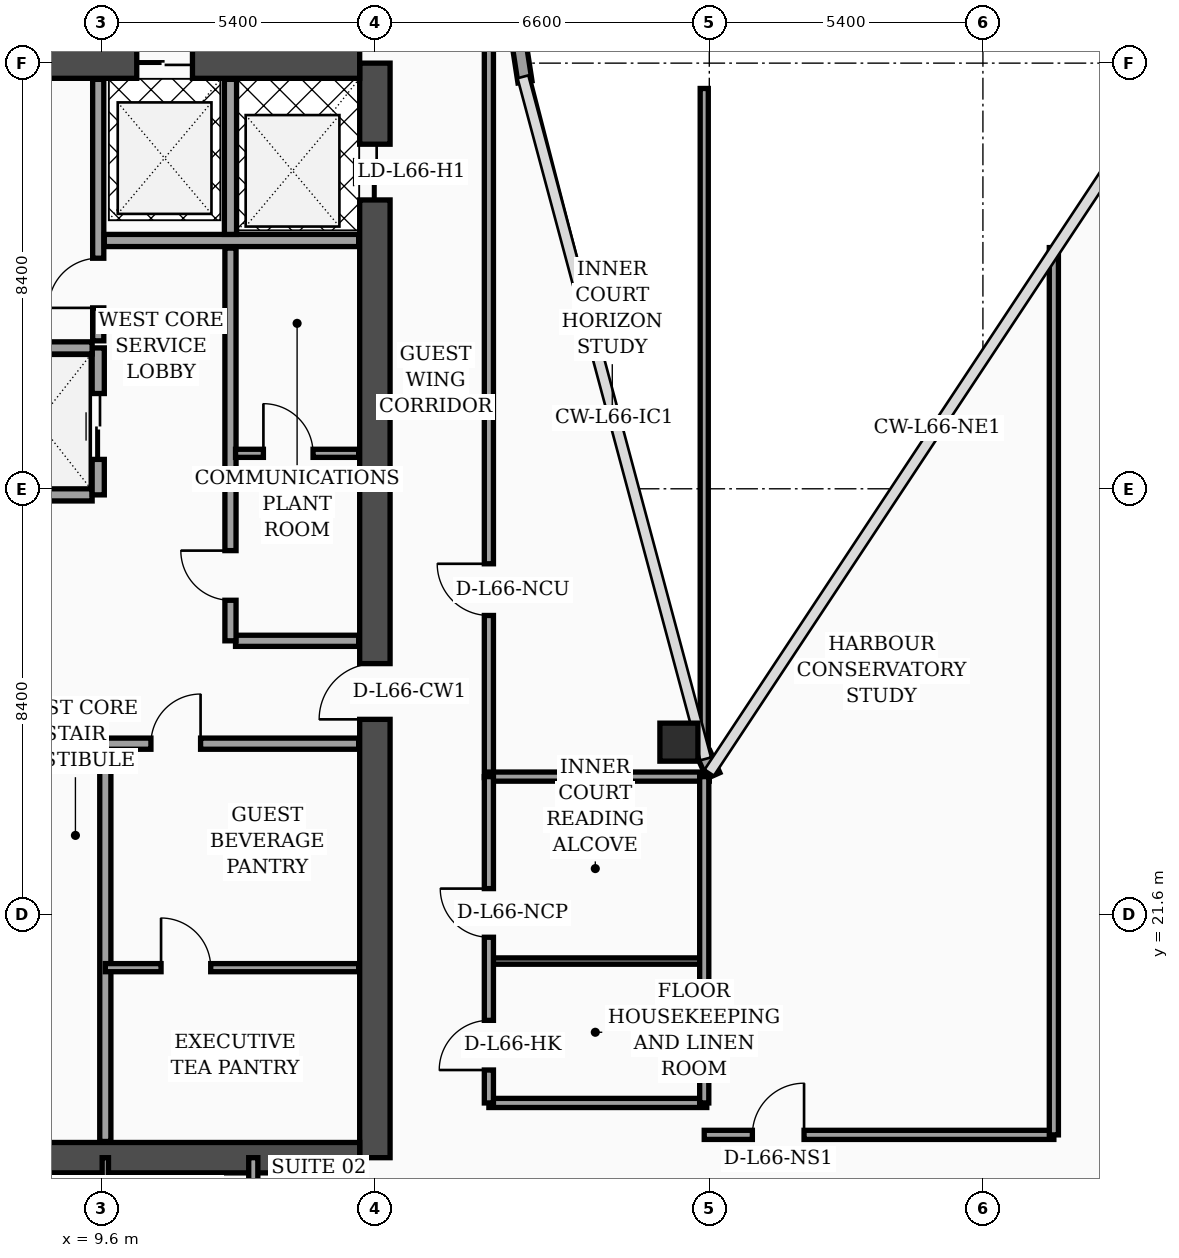
"""IFC4 building model, lengths in metres.
Left out: names, types, materials, properties, quantities, classifications, styles, units other than length and angle.
Written with IfcOpenShell. Run it as: python <this file> out.ifc"""

import sys

from ifc_helpers import new_model, si_unit, direction, frame, frame_2d, origin, origin_2d, place, context, subcontext, project, spatial, rectangle, hollow_rectangle, extrude, element, fill, save


model = new_model("IFC4")
c1 = context("Model", 3, precision=1e-05, world=origin(), true_north=direction((0.0, 1.0)))
c2 = subcontext(c1, "Body", "Model", "MODEL_VIEW")
j1 = project(units=[si_unit("LENGTHUNIT", "METRE"), si_unit("PLANEANGLEUNIT", "RADIAN")], contexts=[c1])
p1 = place(None, origin())
s1 = spatial("IfcSite", under=j1, at=p1, CompositionType="ELEMENT")
p2 = place(p1, origin())
s2 = spatial("IfcBuilding", under=s1, at=p2, CompositionType="ELEMENT")
p3 = place(p2, frame((0.0, 0.0, 267.3)))
s3 = spatial("IfcBuildingStorey", under=s2, at=p3, CompositionType="ELEMENT", Elevation=267.3)
p4 = place(p3, frame((15.0, 16.8, 0.0), z_axis=(0.0, 0.0, 1.0), x_axis=(0.0, 1.0, 0.0)))
e1 = element("IfcWall", 1, at=p4, inside=s3, PredefinedType="SHEAR", context=c2, shape_type="SweptSolid", body=[
    extrude(rectangle(XDim=21.6, YDim=0.6, at=frame_2d((10.8, 0.0))), origin(), (0.0, 0.0, 1.0), 3.56),
])
p5 = place(p4, frame((8.65, 0.0, 0.0)))
e2 = element("IfcOpeningElement", 2, at=p5, cuts=e1, PredefinedType="OPENING", context=c2, shape_type="SweptSolid", body=[
    extrude(rectangle(XDim=1.1, YDim=2.2, at=frame_2d((0.55, 1.1))), frame((0.0, 0.31, 0.0), z_axis=(0.0, -1.0, 0.0), x_axis=(1.0, 0.0, 0.0)), (0.0, 0.0, 1.0), 0.62),
])
p6 = place(p4, frame((18.9, 0.0, 0.0)))
e3 = element("IfcOpeningElement", 3, at=p6, cuts=e1, PredefinedType="OPENING", context=c2, shape_type="SweptSolid", body=[
    extrude(rectangle(XDim=1.1, YDim=2.2, at=frame_2d((0.55, 1.1))), frame((0.0, 0.31, 0.0), z_axis=(0.0, -1.0, 0.0), x_axis=(1.0, 0.0, 0.0)), (0.0, 0.0, 1.0), 0.62),
])
p7 = place(p3, frame((4.5, 38.4, 0.0), z_axis=(0.0, 0.0, 1.0), x_axis=(1.0, 0.0, 0.0)))
e4 = element("IfcWall", 4, at=p7, inside=s3, PredefinedType="SHEAR", context=c2, shape_type="SweptSolid", body=[
    extrude(rectangle(XDim=10.2, YDim=0.6, at=frame_2d((5.1, 0.0))), origin(), (0.0, 0.0, 1.0), 3.56),
])
p8 = place(p7, frame((5.8, 0.0, 0.0)))
e5 = element("IfcOpeningElement", 5, at=p8, cuts=e4, PredefinedType="OPENING", context=c2, shape_type="SweptSolid", body=[
    extrude(rectangle(XDim=1.1, YDim=2.2, at=frame_2d((0.55, 1.1))), frame((0.0, 0.31, 0.0), z_axis=(0.0, -1.0, 0.0), x_axis=(1.0, 0.0, 0.0)), (0.0, 0.0, 1.0), 0.62),
])
p9 = place(p3, frame((4.5, 16.8, 0.0), z_axis=(0.0, 0.0, 1.0), x_axis=(1.0, 0.0, 0.0)))
e6 = element("IfcWall", 6, at=p9, inside=s3, PredefinedType="SHEAR", context=c2, shape_type="SweptSolid", body=[
    extrude(rectangle(XDim=10.2, YDim=0.6, at=frame_2d((5.1, 0.0))), origin(), (0.0, 0.0, 1.0), 3.56),
])
p10 = place(p3, frame((21.0, 25.0, 0.0), z_axis=(0.0, 0.0, 1.0), x_axis=(1.0, 0.0, 0.0)))
e7 = element("IfcColumn", 7, at=p10, inside=s3, PredefinedType="COLUMN", context=c2, shape_type="SweptSolid", body=[
    extrude(hollow_rectangle(XDim=0.75, YDim=0.75, WallThickness=0.032, at=origin_2d()), origin(), (0.0, 0.0, 1.0), 3.56),
])
p11 = place(p3, frame((21.68, 24.34, 0.0), z_axis=(0.0, 0.0, 1.0), x_axis=(-0.40758134973, 0.913168901875, 0.0)))
e8 = element("IfcWall", 8, at=p11, inside=s3, PredefinedType="SOLIDWALL", context=c2, shape_type="SweptSolid", body=[
    extrude(rectangle(XDim=0.471, YDim=0.28, at=frame_2d((0.235, 0.0))), origin(), (0.0, 0.0, 1.0), 3.56),
])
p12 = place(p3, frame((17.962, 38.03, 0.0), z_axis=(0.0, 0.0, 1.0), x_axis=(-0.15141125477, 0.988470855377, 0.0)))
e9 = element("IfcWall", 9, at=p12, inside=s3, PredefinedType="SOLIDWALL", context=c2, shape_type="SweptSolid", body=[
    extrude(rectangle(XDim=0.739, YDim=0.28, at=frame_2d((0.369, 0.0))), origin(), (0.0, 0.0, 1.0), 3.56),
])
p13 = place(p3, frame((4.52, 29.88, 0.0), z_axis=(0.0, 0.0, 1.0), x_axis=(1.0, 0.0, 0.0)))
e10 = element("IfcWall", 10, at=p13, inside=s3, PredefinedType="SOLIDWALL", context=c2, shape_type="SweptSolid", body=[
    extrude(rectangle(XDim=4.9, YDim=0.24, at=frame_2d((2.45, 0.0))), origin(), (0.0, 0.0, 1.0), 3.56),
])
p14 = place(p13, frame((0.45, 0.0, 0.0)))
e11 = element("IfcOpeningElement", 11, at=p14, cuts=e10, PredefinedType="OPENING", context=c2, shape_type="SweptSolid", body=[
    extrude(rectangle(XDim=1.3, YDim=2.35, at=frame_2d((0.65, 1.175))), frame((0.0, 0.13, 0.0), z_axis=(0.0, -1.0, 0.0), x_axis=(1.0, 0.0, 0.0)), (0.0, 0.0, 1.0), 0.26),
])
p15 = place(p3, frame((9.54, 29.88, 0.0), z_axis=(0.0, 0.0, 1.0), x_axis=(0.0, 1.0, 0.0)))
e12 = element("IfcWall", 12, at=p15, inside=s3, PredefinedType="SOLIDWALL", context=c2, shape_type="SweptSolid", body=[
    extrude(rectangle(XDim=2.9, YDim=0.24, at=frame_2d((1.45, 0.0))), origin(), (0.0, 0.0, 1.0), 3.56),
])
p16 = place(p15, frame((0.7, 0.0, 0.0)))
e13 = element("IfcOpeningElement", 13, at=p16, cuts=e12, PredefinedType="OPENING", context=c2, shape_type="SweptSolid", body=[
    extrude(rectangle(XDim=1.3, YDim=2.35, at=frame_2d((0.65, 1.175))), frame((0.0, 0.13, 0.0), z_axis=(0.0, -1.0, 0.0), x_axis=(1.0, 0.0, 0.0)), (0.0, 0.0, 1.0), 0.26),
])
p17 = place(p3, frame((4.52, 32.78, 0.0), z_axis=(0.0, 0.0, 1.0), x_axis=(1.0, 0.0, 0.0)))
e14 = element("IfcWall", 14, at=p17, inside=s3, PredefinedType="SOLIDWALL", context=c2, shape_type="SweptSolid", body=[
    extrude(rectangle(XDim=4.9, YDim=0.24, at=frame_2d((2.45, 0.0))), origin(), (0.0, 0.0, 1.0), 3.19),
])
p18 = place(p3, frame((9.68, 17.12, 0.0), z_axis=(0.0, 0.0, 1.0), x_axis=(0.0, 1.0, 0.0)))
e15 = element("IfcWall", 15, at=p18, inside=s3, PredefinedType="SOLIDWALL", context=c2, shape_type="SweptSolid", body=[
    extrude(rectangle(XDim=7.88, YDim=0.22, at=frame_2d((3.94, 0.0))), origin(), (0.0, 0.0, 1.0), 3.56),
])
p19 = place(p3, frame((9.54, 32.92, 0.0), z_axis=(0.0, 0.0, 1.0), x_axis=(0.0, 1.0, 0.0)))
e16 = element("IfcWall", 16, at=p19, inside=s3, PredefinedType="SOLIDWALL", context=c2, shape_type="SweptSolid", body=[
    extrude(rectangle(XDim=5.16, YDim=0.22, at=frame_2d((2.58, 0.0))), origin(), (0.0, 0.0, 1.0), 3.56),
])
p20 = place(p19, frame((0.65, 0.0, 0.0)))
e17 = element("IfcOpeningElement", 17, at=p20, cuts=e16, PredefinedType="OPENING", context=c2, shape_type="SweptSolid", body=[
    extrude(rectangle(XDim=0.98, YDim=2.15, at=frame_2d((0.49, 1.075))), frame((0.0, 0.12, 0.0), z_axis=(0.0, -1.0, 0.0), x_axis=(1.0, 0.0, 0.0)), (0.0, 0.0, 1.0), 0.24),
])
p21 = place(p3, frame((9.68, 20.55, 0.0), z_axis=(0.0, 0.0, 1.0), x_axis=(1.0, 0.0, 0.0)))
e18 = element("IfcWall", 18, at=p21, inside=s3, PredefinedType="PARTITIONING", context=c2, shape_type="SweptSolid", body=[
    extrude(rectangle(XDim=5.0, YDim=0.16, at=frame_2d((2.5, 0.0))), origin(), (0.0, 0.0, 1.0), 3.56),
])
p22 = place(p21, frame((1.1, 0.0, 0.0)))
e19 = element("IfcOpeningElement", 19, at=p22, cuts=e18, PredefinedType="OPENING", context=c2, shape_type="SweptSolid", body=[
    extrude(rectangle(XDim=0.98, YDim=2.15, at=frame_2d((0.49, 1.075))), frame((0.0, 0.09, 0.0), z_axis=(0.0, -1.0, 0.0), x_axis=(1.0, 0.0, 0.0)), (0.0, 0.0, 1.0), 0.18),
])
p23 = place(p3, frame((9.68, 24.97, 0.0), z_axis=(0.0, 0.0, 1.0), x_axis=(1.0, 0.0, 0.0)))
e20 = element("IfcWall", 20, at=p23, inside=s3, PredefinedType="SOLIDWALL", context=c2, shape_type="SweptSolid", body=[
    extrude(rectangle(XDim=5.0, YDim=0.22, at=frame_2d((2.5, 0.0))), origin(), (0.0, 0.0, 1.0), 2.99),
])
p24 = place(p23, frame((0.9, 0.0, 0.0)))
e21 = element("IfcOpeningElement", 21, at=p24, cuts=e20, PredefinedType="OPENING", context=c2, shape_type="SweptSolid", body=[
    extrude(rectangle(XDim=0.98, YDim=2.15, at=frame_2d((0.49, 1.075))), frame((0.0, 0.12, 0.0), z_axis=(0.0, -1.0, 0.0), x_axis=(1.0, 0.0, 0.0)), (0.0, 0.0, 1.0), 0.24),
])
p25 = place(p3, frame((12.25, 27.0, 0.0), z_axis=(0.0, 0.0, 1.0), x_axis=(1.0, 0.0, 0.0)))
e22 = element("IfcWall", 22, at=p25, inside=s3, PredefinedType="SOLIDWALL", context=c2, shape_type="SweptSolid", body=[
    extrude(rectangle(XDim=2.43, YDim=0.22, at=frame_2d((1.215, 0.0))), origin(), (0.0, 0.0, 1.0), 3.56),
])
p26 = place(p3, frame((12.15, 27.0, 0.0), z_axis=(0.0, 0.0, 1.0), x_axis=(0.0, 1.0, 0.0)))
e23 = element("IfcWall", 23, at=p26, inside=s3, PredefinedType="SOLIDWALL", context=c2, shape_type="SweptSolid", body=[
    extrude(rectangle(XDim=7.75, YDim=0.22, at=frame_2d((3.875, 0.0))), origin(), (0.0, 0.0, 1.0), 3.56),
])
p27 = place(p26, frame((0.8, 0.0, 0.0)))
e24 = element("IfcOpeningElement", 24, at=p27, cuts=e23, PredefinedType="OPENING", context=c2, shape_type="SweptSolid", body=[
    extrude(rectangle(XDim=0.98, YDim=2.15, at=frame_2d((0.49, 1.075))), frame((0.0, 0.12, 0.0), z_axis=(0.0, -1.0, 0.0), x_axis=(1.0, 0.0, 0.0)), (0.0, 0.0, 1.0), 0.24),
])
p28 = place(p3, frame((12.25, 30.7, 0.0), z_axis=(0.0, 0.0, 1.0), x_axis=(1.0, 0.0, 0.0)))
e25 = element("IfcWall", 25, at=p28, inside=s3, PredefinedType="PARTITIONING", context=c2, shape_type="SweptSolid", body=[
    extrude(rectangle(XDim=2.43, YDim=0.16, at=frame_2d((1.215, 0.0))), origin(), (0.0, 0.0, 1.0), 3.56),
])
p29 = place(p28, frame((0.55, 0.0, 0.0)))
e26 = element("IfcOpeningElement", 26, at=p29, cuts=e25, PredefinedType="OPENING", context=c2, shape_type="SweptSolid", body=[
    extrude(rectangle(XDim=0.98, YDim=2.15, at=frame_2d((0.49, 1.075))), frame((0.0, 0.09, 0.0), z_axis=(0.0, -1.0, 0.0), x_axis=(1.0, 0.0, 0.0)), (0.0, 0.0, 1.0), 0.18),
])
p30 = place(p3, frame((9.66, 34.9, 0.0), z_axis=(0.0, 0.0, 1.0), x_axis=(1.0, 0.0, 0.0)))
e27 = element("IfcWall", 27, at=p30, inside=s3, PredefinedType="SOLIDWALL", context=c2, shape_type="SweptSolid", body=[
    extrude(rectangle(XDim=5.02, YDim=0.24, at=frame_2d((2.51, 0.0))), origin(), (0.0, 0.0, 1.0), 3.56),
])
p31 = place(p3, frame((12.15, 35.02, 0.0), z_axis=(0.0, 0.0, 1.0), x_axis=(0.0, 1.0, 0.0)))
e28 = element("IfcWall", 28, at=p31, inside=s3, PredefinedType="SOLIDWALL", context=c2, shape_type="SweptSolid", body=[
    extrude(rectangle(XDim=3.06, YDim=0.24, at=frame_2d((1.53, 0.0))), origin(), (0.0, 0.0, 1.0), 3.56),
])
p32 = place(p3, frame((9.68, 14.67, 0.0), z_axis=(0.0, 0.0, 1.0), x_axis=(0.0, 1.0, 0.0)))
e29 = element("IfcWall", 29, at=p32, inside=s3, PredefinedType="PARTITIONING", context=c2, shape_type="SweptSolid", body=[
    extrude(rectangle(XDim=2.13, YDim=0.125, at=frame_2d((1.065, 0.0))), origin(), (0.0, 0.0, 1.0), 3.56),
])
p33 = place(p3, frame((12.6, 2.44, 0.0), z_axis=(0.0, 0.0, 1.0), x_axis=(0.0, 1.0, 0.0)))
e30 = element("IfcWall", 30, at=p33, inside=s3, PredefinedType="PARTITIONING", context=c2, shape_type="SweptSolid", body=[
    extrude(rectangle(XDim=14.36, YDim=0.18, at=frame_2d((7.18, 0.0))), origin(), (0.0, 0.0, 1.0), 2.99),
])
p34 = place(p33, frame((3.01, 0.0, 0.0)))
e31 = element("IfcOpeningElement", 31, at=p34, cuts=e30, PredefinedType="OPENING", context=c2, shape_type="SweptSolid", body=[
    extrude(rectangle(XDim=1.02, YDim=2.2, at=frame_2d((0.51, 1.1))), frame((0.0, 0.1, 0.0), z_axis=(0.0, -1.0, 0.0), x_axis=(1.0, 0.0, 0.0)), (0.0, 0.0, 1.0), 0.2),
])
p35 = place(p33, frame((8.94, 0.0, 0.0)))
e32 = element("IfcOpeningElement", 32, at=p35, cuts=e30, PredefinedType="OPENING", context=c2, shape_type="SweptSolid", body=[
    extrude(rectangle(XDim=1.02, YDim=2.2, at=frame_2d((0.51, 1.1))), frame((0.0, 0.1, 0.0), z_axis=(0.0, -1.0, 0.0), x_axis=(1.0, 0.0, 0.0)), (0.0, 0.0, 1.0), 0.2),
])
p36 = place(p3, frame((17.25, 24.3, 0.0), z_axis=(0.0, 0.0, 1.0), x_axis=(0.0, 1.0, 0.0)))
e33 = element("IfcWall", 33, at=p36, inside=s3, PredefinedType="PARTITIONING", context=c2, shape_type="SweptSolid", body=[
    extrude(rectangle(XDim=18.15, YDim=0.18, at=frame_2d((9.075, 0.0))), origin(), (0.0, 0.0, 1.0), 2.99),
])
p37 = place(p36, frame((3.2, 0.0, 0.0)))
e34 = element("IfcOpeningElement", 34, at=p37, cuts=e33, PredefinedType="OPENING", context=c2, shape_type="SweptSolid", body=[
    extrude(rectangle(XDim=1.02, YDim=2.2, at=frame_2d((0.51, 1.1))), frame((0.0, 0.1, 0.0), z_axis=(0.0, -1.0, 0.0), x_axis=(1.0, 0.0, 0.0)), (0.0, 0.0, 1.0), 0.2),
])
p38 = place(p3, frame((17.25, 17.88, 0.0), z_axis=(0.0, 0.0, 1.0), x_axis=(1.0, 0.0, 0.0)))
e35 = element("IfcWall", 35, at=p38, inside=s3, PredefinedType="PARTITIONING", context=c2, shape_type="SweptSolid", body=[
    extrude(rectangle(XDim=4.3, YDim=0.18, at=frame_2d((2.15, 0.0))), origin(), (0.0, 0.0, 1.0), 3.09),
])
p39 = place(p3, frame((17.25, 20.68, 0.0), z_axis=(0.0, 0.0, 1.0), x_axis=(1.0, 0.0, 0.0)))
e36 = element("IfcWall", 36, at=p39, inside=s3, PredefinedType="PARTITIONING", context=c2, shape_type="SweptSolid", body=[
    extrude(rectangle(XDim=4.3, YDim=0.125, at=frame_2d((2.15, 0.0))), origin(), (0.0, 0.0, 1.0), 3.56),
])
p40 = place(p3, frame((17.25, 24.32, 0.0), z_axis=(0.0, 0.0, 1.0), x_axis=(1.0, 0.0, 0.0)))
e37 = element("IfcWall", 37, at=p40, inside=s3, PredefinedType="PARTITIONING", context=c2, shape_type="SweptSolid", body=[
    extrude(rectangle(XDim=4.35, YDim=0.18, at=frame_2d((2.175, 0.0))), origin(), (0.0, 0.0, 1.0), 3.56),
])
p41 = place(p3, frame((21.5, 17.88, 0.0), z_axis=(0.0, 0.0, 1.0), x_axis=(0.0, 1.0, 0.0)))
e38 = element("IfcWall", 38, at=p41, inside=s3, PredefinedType="PARTITIONING", context=c2, shape_type="SweptSolid", body=[
    extrude(rectangle(XDim=6.44, YDim=0.18, at=frame_2d((3.22, 0.0))), origin(), (0.0, 0.0, 1.0), 3.09),
])
p42 = place(p3, frame((17.25, 17.88, 0.0), z_axis=(0.0, 0.0, 1.0), x_axis=(0.0, 1.0, 0.0)))
e39 = element("IfcWall", 39, at=p42, inside=s3, PredefinedType="PARTITIONING", context=c2, shape_type="SweptSolid", body=[
    extrude(rectangle(XDim=6.44, YDim=0.18, at=frame_2d((3.22, 0.0))), origin(), (0.0, 0.0, 1.0), 3.09),
])
p43 = place(p42, frame((0.65, 0.0, 0.0)))
e40 = element("IfcOpeningElement", 40, at=p43, cuts=e39, PredefinedType="OPENING", context=c2, shape_type="SweptSolid", body=[
    extrude(rectangle(XDim=0.98, YDim=2.15, at=frame_2d((0.49, 1.075))), frame((0.0, 0.1, 0.0), z_axis=(0.0, -1.0, 0.0), x_axis=(1.0, 0.0, 0.0)), (0.0, 0.0, 1.0), 0.2),
])
p44 = place(p42, frame((3.27, 0.0, 0.0)))
e41 = element("IfcOpeningElement", 41, at=p44, cuts=e39, PredefinedType="OPENING", context=c2, shape_type="SweptSolid", body=[
    extrude(rectangle(XDim=0.96, YDim=2.2, at=frame_2d((0.48, 1.1))), frame((0.0, 0.1, 0.0), z_axis=(0.0, -1.0, 0.0), x_axis=(1.0, 0.0, 0.0)), (0.0, 0.0, 1.0), 0.2),
])
p45 = place(p3, frame((21.5, 24.85, 0.0), z_axis=(0.0, 0.0, 1.0), x_axis=(0.0, 1.0, 0.0)))
e42 = element("IfcWall", 42, at=p45, inside=s3, PredefinedType="PARTITIONING", context=c2, shape_type="SweptSolid", body=[
    extrude(rectangle(XDim=13.05, YDim=0.16, at=frame_2d((6.525, 0.0))), origin(), (0.0, 0.0, 1.0), 2.99),
])
p46 = place(p3, frame((21.5, 17.25, 0.0), z_axis=(0.0, 0.0, 1.0), x_axis=(1.0, 0.0, 0.0)))
e43 = element("IfcWall", 43, at=p46, inside=s3, PredefinedType="PARTITIONING", context=c2, shape_type="SweptSolid", body=[
    extrude(rectangle(XDim=6.9, YDim=0.18, at=frame_2d((3.45, 0.0))), origin(), (0.0, 0.0, 1.0), 3.56),
])
p47 = place(p46, frame((0.95, 0.0, 0.0)))
e44 = element("IfcOpeningElement", 44, at=p47, cuts=e43, PredefinedType="OPENING", context=c2, shape_type="SweptSolid", body=[
    extrude(rectangle(XDim=1.02, YDim=2.2, at=frame_2d((0.51, 1.1))), frame((0.0, 0.1, 0.0), z_axis=(0.0, -1.0, 0.0), x_axis=(1.0, 0.0, 0.0)), (0.0, 0.0, 1.0), 0.2),
])
p48 = place(p3, frame((28.4, 17.25, 0.0), z_axis=(0.0, 0.0, 1.0), x_axis=(0.0, 1.0, 0.0)))
e45 = element("IfcWall", 45, at=p48, inside=s3, PredefinedType="PARTITIONING", context=c2, shape_type="SweptSolid", body=[
    extrude(rectangle(XDim=17.51, YDim=0.18, at=frame_2d((8.755, 0.0))), origin(), (0.0, 0.0, 1.0), 3.09),
])
p49 = place(p16, origin())
e46 = element("IfcDoor", 46, at=p49, inside=s3, OperationType="DOUBLE_DOOR_SLIDING", PredefinedType="DOOR", context=c2, shape_type="SweptSolid", body=[
    extrude(rectangle(XDim=1.3, YDim=2.35, at=frame_2d((0.65, 1.175))), frame((0.0, 0.025, 0.0), z_axis=(0.0, -1.0, 0.0), x_axis=(1.0, 0.0, 0.0)), (0.0, 0.0, 1.0), 0.05),
])
fill(e13, e46)
p50 = place(p20, origin())
e47 = element("IfcDoor", 47, at=p50, inside=s3, OperationType="SINGLE_SWING_LEFT", PredefinedType="DOOR", context=c2, shape_type="SweptSolid", body=[
    extrude(rectangle(XDim=0.98, YDim=2.15, at=frame_2d((0.49, 1.075))), frame((0.0, 0.025, 0.0), z_axis=(0.0, -1.0, 0.0), x_axis=(1.0, 0.0, 0.0)), (0.0, 0.0, 1.0), 0.05),
])
fill(e17, e47)
p51 = place(p22, origin())
e48 = element("IfcDoor", 48, at=p51, inside=s3, OperationType="SINGLE_SWING_LEFT", PredefinedType="DOOR", context=c2, shape_type="SweptSolid", body=[
    extrude(rectangle(XDim=0.98, YDim=2.15, at=frame_2d((0.49, 1.075))), frame((0.0, 0.025, 0.0), z_axis=(0.0, -1.0, 0.0), x_axis=(1.0, 0.0, 0.0)), (0.0, 0.0, 1.0), 0.05),
])
fill(e19, e48)
p52 = place(p24, origin())
e49 = element("IfcDoor", 49, at=p52, inside=s3, OperationType="SINGLE_SWING_RIGHT", PredefinedType="DOOR", context=c2, shape_type="SweptSolid", body=[
    extrude(rectangle(XDim=0.98, YDim=2.15, at=frame_2d((0.49, 1.075))), frame((0.0, 0.025, 0.0), z_axis=(0.0, -1.0, 0.0), x_axis=(1.0, 0.0, 0.0)), (0.0, 0.0, 1.0), 0.05),
])
fill(e21, e49)
p53 = place(p27, origin())
e50 = element("IfcDoor", 50, at=p53, inside=s3, OperationType="SINGLE_SWING_RIGHT", PredefinedType="DOOR", context=c2, shape_type="SweptSolid", body=[
    extrude(rectangle(XDim=0.98, YDim=2.15, at=frame_2d((0.49, 1.075))), frame((0.0, 0.025, 0.0), z_axis=(0.0, -1.0, 0.0), x_axis=(1.0, 0.0, 0.0)), (0.0, 0.0, 1.0), 0.05),
])
fill(e24, e50)
p54 = place(p29, origin())
e51 = element("IfcDoor", 51, at=p54, inside=s3, OperationType="SINGLE_SWING_LEFT", PredefinedType="DOOR", context=c2, shape_type="SweptSolid", body=[
    extrude(rectangle(XDim=0.98, YDim=2.15, at=frame_2d((0.49, 1.075))), frame((0.0, 0.025, 0.0), z_axis=(0.0, -1.0, 0.0), x_axis=(1.0, 0.0, 0.0)), (0.0, 0.0, 1.0), 0.05),
])
fill(e26, e51)
p55 = place(p37, origin())
e52 = element("IfcDoor", 52, at=p55, inside=s3, OperationType="SINGLE_SWING_RIGHT", PredefinedType="DOOR", context=c2, shape_type="SweptSolid", body=[
    extrude(rectangle(XDim=1.02, YDim=2.2, at=frame_2d((0.51, 1.1))), frame((0.0, 0.025, 0.0), z_axis=(0.0, -1.0, 0.0), x_axis=(1.0, 0.0, 0.0)), (0.0, 0.0, 1.0), 0.05),
])
fill(e34, e52)
p56 = place(p43, origin())
e53 = element("IfcDoor", 53, at=p56, inside=s3, OperationType="SINGLE_SWING_LEFT", PredefinedType="DOOR", context=c2, shape_type="SweptSolid", body=[
    extrude(rectangle(XDim=0.98, YDim=2.15, at=frame_2d((0.49, 1.075))), frame((0.0, 0.025, 0.0), z_axis=(0.0, -1.0, 0.0), x_axis=(1.0, 0.0, 0.0)), (0.0, 0.0, 1.0), 0.05),
])
fill(e40, e53)
p57 = place(p44, origin())
e54 = element("IfcDoor", 54, at=p57, inside=s3, OperationType="SINGLE_SWING_RIGHT", PredefinedType="DOOR", context=c2, shape_type="SweptSolid", body=[
    extrude(rectangle(XDim=0.96, YDim=2.2, at=frame_2d((0.48, 1.1))), frame((0.0, 0.025, 0.0), z_axis=(0.0, -1.0, 0.0), x_axis=(1.0, 0.0, 0.0)), (0.0, 0.0, 1.0), 0.05),
])
fill(e41, e54)
p58 = place(p47, origin())
e55 = element("IfcDoor", 55, at=p58, inside=s3, OperationType="SINGLE_SWING_RIGHT", PredefinedType="DOOR", context=c2, shape_type="SweptSolid", body=[
    extrude(rectangle(XDim=1.02, YDim=2.2, at=frame_2d((0.51, 1.1))), frame((0.0, 0.025, 0.0), z_axis=(0.0, -1.0, 0.0), x_axis=(1.0, 0.0, 0.0)), (0.0, 0.0, 1.0), 0.05),
])
fill(e44, e55)
p59 = place(p5, origin())
e56 = element("IfcDoor", 56, at=p59, inside=s3, OperationType="SINGLE_SWING_LEFT", PredefinedType="DOOR", context=c2, shape_type="SweptSolid", body=[
    extrude(rectangle(XDim=1.1, YDim=2.2, at=frame_2d((0.55, 1.1))), frame((0.0, 0.025, 0.0), z_axis=(0.0, -1.0, 0.0), x_axis=(1.0, 0.0, 0.0)), (0.0, 0.0, 1.0), 0.05),
])
fill(e2, e56)
p60 = place(p6, origin())
e57 = element("IfcDoor", 57, at=p60, inside=s3, OperationType="DOUBLE_DOOR_SLIDING", PredefinedType="DOOR", context=c2, shape_type="SweptSolid", body=[
    extrude(rectangle(XDim=1.1, YDim=2.2, at=frame_2d((0.55, 1.1))), frame((0.0, 0.025, 0.0), z_axis=(0.0, -1.0, 0.0), x_axis=(1.0, 0.0, 0.0)), (0.0, 0.0, 1.0), 0.05),
])
fill(e3, e57)
p61 = place(p8, origin())
e58 = element("IfcDoor", 58, at=p61, inside=s3, OperationType="DOUBLE_DOOR_SLIDING", PredefinedType="DOOR", context=c2, shape_type="SweptSolid", body=[
    extrude(rectangle(XDim=1.1, YDim=2.2, at=frame_2d((0.55, 1.1))), frame((0.0, 0.025, 0.0), z_axis=(0.0, -1.0, 0.0), x_axis=(1.0, 0.0, 0.0)), (0.0, 0.0, 1.0), 0.05),
])
fill(e5, e58)
save(model, sys.argv[1])
